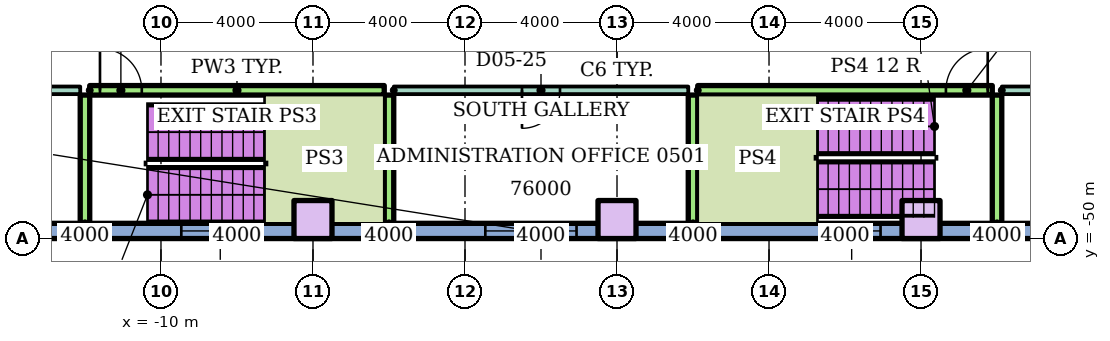
"""IFC4 building model, lengths in metres.
Left out: names, types, materials, properties, quantities, classifications, styles, units other than length and angle.
Written with IfcOpenShell. Run it as: python <this file> out.ifc"""

import sys

from ifc_helpers import new_model, si_unit, direction, frame, frame_2d, origin, origin_2d, place, context, subcontext, project, spatial, rectangle, extrude, element, fill, save


model = new_model("IFC4")
c1 = context("Model", 3, precision=1e-05, world=origin(), true_north=direction((0.0, 1.0)))
c2 = subcontext(c1, "Body", "Model", "MODEL_VIEW")
j1 = project(units=[si_unit("LENGTHUNIT", "METRE"), si_unit("PLANEANGLEUNIT", "RADIAN")], contexts=[c1])
p1 = place(None, origin())
s1 = spatial("IfcSite", under=j1, at=p1, CompositionType="ELEMENT")
p2 = place(p1, origin())
s2 = spatial("IfcBuilding", under=s1, at=p2, CompositionType="ELEMENT")
p3 = place(p2, frame((0.0, 0.0, 22.0)))
s3 = spatial("IfcBuildingStorey", under=s2, at=p3, CompositionType="ELEMENT", Elevation=22.0)
for number, where in (
    (1, (-6.0, -49.5, 0.0)),
    (2, (2.0, -49.5, 0.0)),
    (3, (10.0, -49.5, 0.0)),
):
    element("IfcColumn", number, at=place(p3, frame(where)), inside=s3, PredefinedType="COLUMN", context=c2, shape_type="SweptSolid", body=[
        extrude(rectangle(XDim=1.0, YDim=1.0, at=origin_2d()), origin(), (0.0, 0.0, 1.0), 3.7),
    ])
p4 = place(p3, frame((-39.6, -49.8, 0.0)))
e4 = element("IfcWall", 4, at=p4, inside=s3, PredefinedType="STANDARD", context=c2, shape_type="SweptSolid", body=[
    extrude(rectangle(XDim=79.2, YDim=0.4, at=frame_2d((39.6, 0.0))), origin(), (0.0, 0.0, 1.0), 3.7),
])
p5 = place(p4, frame((10.665, 0.0, 0.9)))
e5 = element("IfcOpeningElement", 5, at=p5, cuts=e4, PredefinedType="OPENING", context=c2, shape_type="SweptSolid", body=[
    extrude(rectangle(XDim=2.4, YDim=2.1, at=frame_2d((1.2, 1.05))), frame((0.0, 0.21, 0.0), z_axis=(0.0, -1.0, 0.0), x_axis=(1.0, 0.0, 0.0)), (0.0, 0.0, 1.0), 0.42),
])
p6 = place(p4, frame((18.665, 0.0, 0.9)))
e6 = element("IfcOpeningElement", 6, at=p6, cuts=e4, PredefinedType="OPENING", context=c2, shape_type="SweptSolid", body=[
    extrude(rectangle(XDim=2.4, YDim=2.1, at=frame_2d((1.2, 1.05))), frame((0.0, 0.21, 0.0), z_axis=(0.0, -1.0, 0.0), x_axis=(1.0, 0.0, 0.0)), (0.0, 0.0, 1.0), 0.42),
])
p7 = place(p4, frame((22.135, 0.0, 0.9)))
e7 = element("IfcOpeningElement", 7, at=p7, cuts=e4, PredefinedType="OPENING", context=c2, shape_type="SweptSolid", body=[
    extrude(rectangle(XDim=2.4, YDim=2.1, at=frame_2d((1.2, 1.05))), frame((0.0, 0.21, 0.0), z_axis=(0.0, -1.0, 0.0), x_axis=(1.0, 0.0, 0.0)), (0.0, 0.0, 1.0), 0.42),
])
p8 = place(p4, frame((30.135, 0.0, 0.9)))
e8 = element("IfcOpeningElement", 8, at=p8, cuts=e4, PredefinedType="OPENING", context=c2, shape_type="SweptSolid", body=[
    extrude(rectangle(XDim=2.05, YDim=2.1, at=frame_2d((1.025, 1.05))), frame((0.0, 0.21, 0.0), z_axis=(0.0, -1.0, 0.0), x_axis=(1.0, 0.0, 0.0)), (0.0, 0.0, 1.0), 0.42),
])
p9 = place(p4, frame((38.135, 0.0, 0.9)))
e9 = element("IfcOpeningElement", 9, at=p9, cuts=e4, PredefinedType="OPENING", context=c2, shape_type="SweptSolid", body=[
    extrude(rectangle(XDim=2.4, YDim=2.1, at=frame_2d((1.2, 1.05))), frame((0.0, 0.21, 0.0), z_axis=(0.0, -1.0, 0.0), x_axis=(1.0, 0.0, 0.0)), (0.0, 0.0, 1.0), 0.42),
])
p10 = place(p4, frame((47.015, 0.0, 0.9)))
e10 = element("IfcOpeningElement", 10, at=p10, cuts=e4, PredefinedType="OPENING", context=c2, shape_type="SweptSolid", body=[
    extrude(rectangle(XDim=1.52, YDim=2.1, at=frame_2d((0.76, 1.05))), frame((0.0, 0.21, 0.0), z_axis=(0.0, -1.0, 0.0), x_axis=(1.0, 0.0, 0.0)), (0.0, 0.0, 1.0), 0.42),
])
p11 = place(p4, frame((54.135, 0.0, 0.9)))
e11 = element("IfcOpeningElement", 11, at=p11, cuts=e4, PredefinedType="OPENING", context=c2, shape_type="SweptSolid", body=[
    extrude(rectangle(XDim=2.4, YDim=2.1, at=frame_2d((1.2, 1.05))), frame((0.0, 0.21, 0.0), z_axis=(0.0, -1.0, 0.0), x_axis=(1.0, 0.0, 0.0)), (0.0, 0.0, 1.0), 0.42),
])
p12 = place(p3, frame((-31.775, -46.1, 0.0)))
e12 = element("IfcWall", 12, at=p12, inside=s3, PredefinedType="PARTITIONING", context=c2, shape_type="SweptSolid", body=[
    extrude(rectangle(XDim=19.65, YDim=0.2, at=frame_2d((9.825, 0.0))), origin(), (0.0, 0.0, 1.0), 3.2),
])
p13 = place(p12, frame((3.425, 0.0, 0.0)))
e13 = element("IfcOpeningElement", 13, at=p13, cuts=e12, PredefinedType="OPENING", context=c2, shape_type="SweptSolid", body=[
    extrude(rectangle(XDim=0.9, YDim=2.1, at=frame_2d((0.45, 1.05))), frame((0.0, 0.11, 0.0), z_axis=(0.0, -1.0, 0.0), x_axis=(1.0, 0.0, 0.0)), (0.0, 0.0, 1.0), 0.22),
])
p14 = place(p12, frame((13.375, 0.0, 0.0)))
e14 = element("IfcOpeningElement", 14, at=p14, cuts=e12, PredefinedType="OPENING", context=c2, shape_type="SweptSolid", body=[
    extrude(rectangle(XDim=0.9, YDim=2.1, at=frame_2d((0.45, 1.05))), frame((0.0, 0.11, 0.0), z_axis=(0.0, -1.0, 0.0), x_axis=(1.0, 0.0, 0.0)), (0.0, 0.0, 1.0), 0.22),
])
p15 = place(p3, frame((-3.875, -46.1, 0.0)))
e15 = element("IfcWall", 15, at=p15, inside=s3, PredefinedType="PARTITIONING", context=c2, shape_type="SweptSolid", body=[
    extrude(rectangle(XDim=7.75, YDim=0.2, at=frame_2d((3.875, 0.0))), origin(), (0.0, 0.0, 1.0), 3.2),
])
p16 = place(p15, frame((3.375, 0.0, 0.0)))
e16 = element("IfcOpeningElement", 16, at=p16, cuts=e15, PredefinedType="OPENING", context=c2, shape_type="SweptSolid", body=[
    extrude(rectangle(XDim=1.0, YDim=2.1, at=frame_2d((0.5, 1.05))), frame((0.0, 0.11, 0.0), z_axis=(0.0, -1.0, 0.0), x_axis=(1.0, 0.0, 0.0)), (0.0, 0.0, 1.0), 0.22),
])
p17 = place(p3, frame((12.125, -46.1, 0.0)))
e17 = element("IfcWall", 17, at=p17, inside=s3, PredefinedType="PARTITIONING", context=c2, shape_type="SweptSolid", body=[
    extrude(rectangle(XDim=19.65, YDim=0.2, at=frame_2d((9.825, 0.0))), origin(), (0.0, 0.0, 1.0), 3.2),
])
p18 = place(p17, frame((4.325, 0.0, 0.0)))
e18 = element("IfcOpeningElement", 18, at=p18, cuts=e17, PredefinedType="OPENING", context=c2, shape_type="SweptSolid", body=[
    extrude(rectangle(XDim=0.9, YDim=2.1, at=frame_2d((0.45, 1.05))), frame((0.0, 0.11, 0.0), z_axis=(0.0, -1.0, 0.0), x_axis=(1.0, 0.0, 0.0)), (0.0, 0.0, 1.0), 0.22),
])
p19 = place(p17, frame((15.325, 0.0, 0.0)))
e19 = element("IfcOpeningElement", 19, at=p19, cuts=e17, PredefinedType="OPENING", context=c2, shape_type="SweptSolid", body=[
    extrude(rectangle(XDim=0.9, YDim=2.1, at=frame_2d((0.45, 1.05))), frame((0.0, 0.11, 0.0), z_axis=(0.0, -1.0, 0.0), x_axis=(1.0, 0.0, 0.0)), (0.0, 0.0, 1.0), 0.22),
])
p20 = place(p3, frame((-11.875, -46.1, 0.0)))
e20 = element("IfcWall", 20, at=p20, inside=s3, PredefinedType="SOLIDWALL", context=c2, shape_type="SweptSolid", body=[
    extrude(rectangle(XDim=7.75, YDim=0.25, at=frame_2d((3.875, 0.0))), origin(), (0.0, 0.0, 1.0), 3.7),
])
p21 = place(p20, frame((0.27, 0.0, 0.0)))
e21 = element("IfcOpeningElement", 21, at=p21, cuts=e20, PredefinedType="OPENING", context=c2, shape_type="SweptSolid", body=[
    extrude(rectangle(XDim=1.1, YDim=2.1, at=frame_2d((0.55, 1.05))), frame((0.0, 0.135, 0.0), z_axis=(0.0, -1.0, 0.0), x_axis=(1.0, 0.0, 0.0)), (0.0, 0.0, 1.0), 0.27),
])
p22 = place(p3, frame((4.125, -46.1, 0.0)))
e22 = element("IfcWall", 22, at=p22, inside=s3, PredefinedType="SOLIDWALL", context=c2, shape_type="SweptSolid", body=[
    extrude(rectangle(XDim=7.75, YDim=0.25, at=frame_2d((3.875, 0.0))), origin(), (0.0, 0.0, 1.0), 3.7),
])
p23 = place(p22, frame((6.53, 0.0, 0.0)))
e23 = element("IfcOpeningElement", 23, at=p23, cuts=e22, PredefinedType="OPENING", context=c2, shape_type="SweptSolid", body=[
    extrude(rectangle(XDim=1.1, YDim=2.1, at=frame_2d((0.55, 1.05))), frame((0.0, 0.135, 0.0), z_axis=(0.0, -1.0, 0.0), x_axis=(1.0, 0.0, 0.0)), (0.0, 0.0, 1.0), 0.27),
])
for number, where, z_axis, x_axis in (
    (24, (-12.0, -49.6, 0.0), (0.0, 0.0, 1.0), (0.0, 1.0, 0.0)),
    (25, (-4.0, -49.6, 0.0), (0.0, 0.0, 1.0), (0.0, 1.0, 0.0)),
    (26, (4.0, -49.6, 0.0), (0.0, 0.0, 1.0), (0.0, 1.0, 0.0)),
    (27, (12.0, -49.6, 0.0), (0.0, 0.0, 1.0), (0.0, 1.0, 0.0)),
):
    element("IfcWall", number, at=place(p3, frame(where, z_axis=z_axis, x_axis=x_axis)), inside=s3, PredefinedType="SOLIDWALL", context=c2, shape_type="SweptSolid", body=[
        extrude(rectangle(XDim=3.375, YDim=0.25, at=frame_2d((1.688, 0.0))), origin(), (0.0, 0.0, 1.0), 3.7),
    ])
p24 = place(p8, origin())
e28 = element("IfcWindow", 28, at=p24, inside=s3, PartitioningType="SINGLE_PANEL", PredefinedType="WINDOW", context=c2, shape_type="SweptSolid", body=[
    extrude(rectangle(XDim=2.05, YDim=2.1, at=frame_2d((1.025, 1.05))), frame((0.0, 0.03, 0.0), z_axis=(0.0, -1.0, 0.0), x_axis=(1.0, 0.0, 0.0)), (0.0, 0.0, 1.0), 0.06),
])
fill(e8, e28)
p25 = place(p9, origin())
e29 = element("IfcWindow", 29, at=p25, inside=s3, PartitioningType="SINGLE_PANEL", PredefinedType="WINDOW", context=c2, shape_type="SweptSolid", body=[
    extrude(rectangle(XDim=2.4, YDim=2.1, at=frame_2d((1.2, 1.05))), frame((0.0, 0.03, 0.0), z_axis=(0.0, -1.0, 0.0), x_axis=(1.0, 0.0, 0.0)), (0.0, 0.0, 1.0), 0.06),
])
fill(e9, e29)
p26 = place(p10, origin())
e30 = element("IfcWindow", 30, at=p26, inside=s3, PartitioningType="SINGLE_PANEL", PredefinedType="WINDOW", context=c2, shape_type="SweptSolid", body=[
    extrude(rectangle(XDim=1.52, YDim=2.1, at=frame_2d((0.76, 1.05))), frame((0.0, 0.03, 0.0), z_axis=(0.0, -1.0, 0.0), x_axis=(1.0, 0.0, 0.0)), (0.0, 0.0, 1.0), 0.06),
])
fill(e10, e30)
p27 = place(p16, frame((1.0, 0.0, 0.0), z_axis=(0.0, 0.0, 1.0), x_axis=(-1.0, 0.0, 0.0)))
e31 = element("IfcDoor", 31, at=p27, inside=s3, OperationType="SINGLE_SWING_LEFT", PredefinedType="DOOR", context=c2, shape_type="SweptSolid", body=[
    extrude(rectangle(XDim=1.0, YDim=2.1, at=frame_2d((0.5, 1.05))), frame((0.0, 0.025, 0.0), z_axis=(0.0, -1.0, 0.0), x_axis=(1.0, 0.0, 0.0)), (0.0, 0.0, 1.0), 0.05),
])
fill(e16, e31)
p28 = place(p21, origin())
e32 = element("IfcDoor", 32, at=p28, inside=s3, OperationType="SINGLE_SWING_LEFT", PredefinedType="DOOR", context=c2, shape_type="SweptSolid", body=[
    extrude(rectangle(XDim=1.1, YDim=2.1, at=frame_2d((0.55, 1.05))), frame((0.0, 0.025, 0.0), z_axis=(0.0, -1.0, 0.0), x_axis=(1.0, 0.0, 0.0)), (0.0, 0.0, 1.0), 0.05),
])
fill(e21, e32)
p29 = place(p23, origin())
e33 = element("IfcDoor", 33, at=p29, inside=s3, OperationType="SINGLE_SWING_RIGHT", PredefinedType="DOOR", context=c2, shape_type="SweptSolid", body=[
    extrude(rectangle(XDim=1.1, YDim=2.1, at=frame_2d((0.55, 1.05))), frame((0.0, 0.025, 0.0), z_axis=(0.0, -1.0, 0.0), x_axis=(1.0, 0.0, 0.0)), (0.0, 0.0, 1.0), 0.05),
])
fill(e23, e33)
save(model, sys.argv[1])
